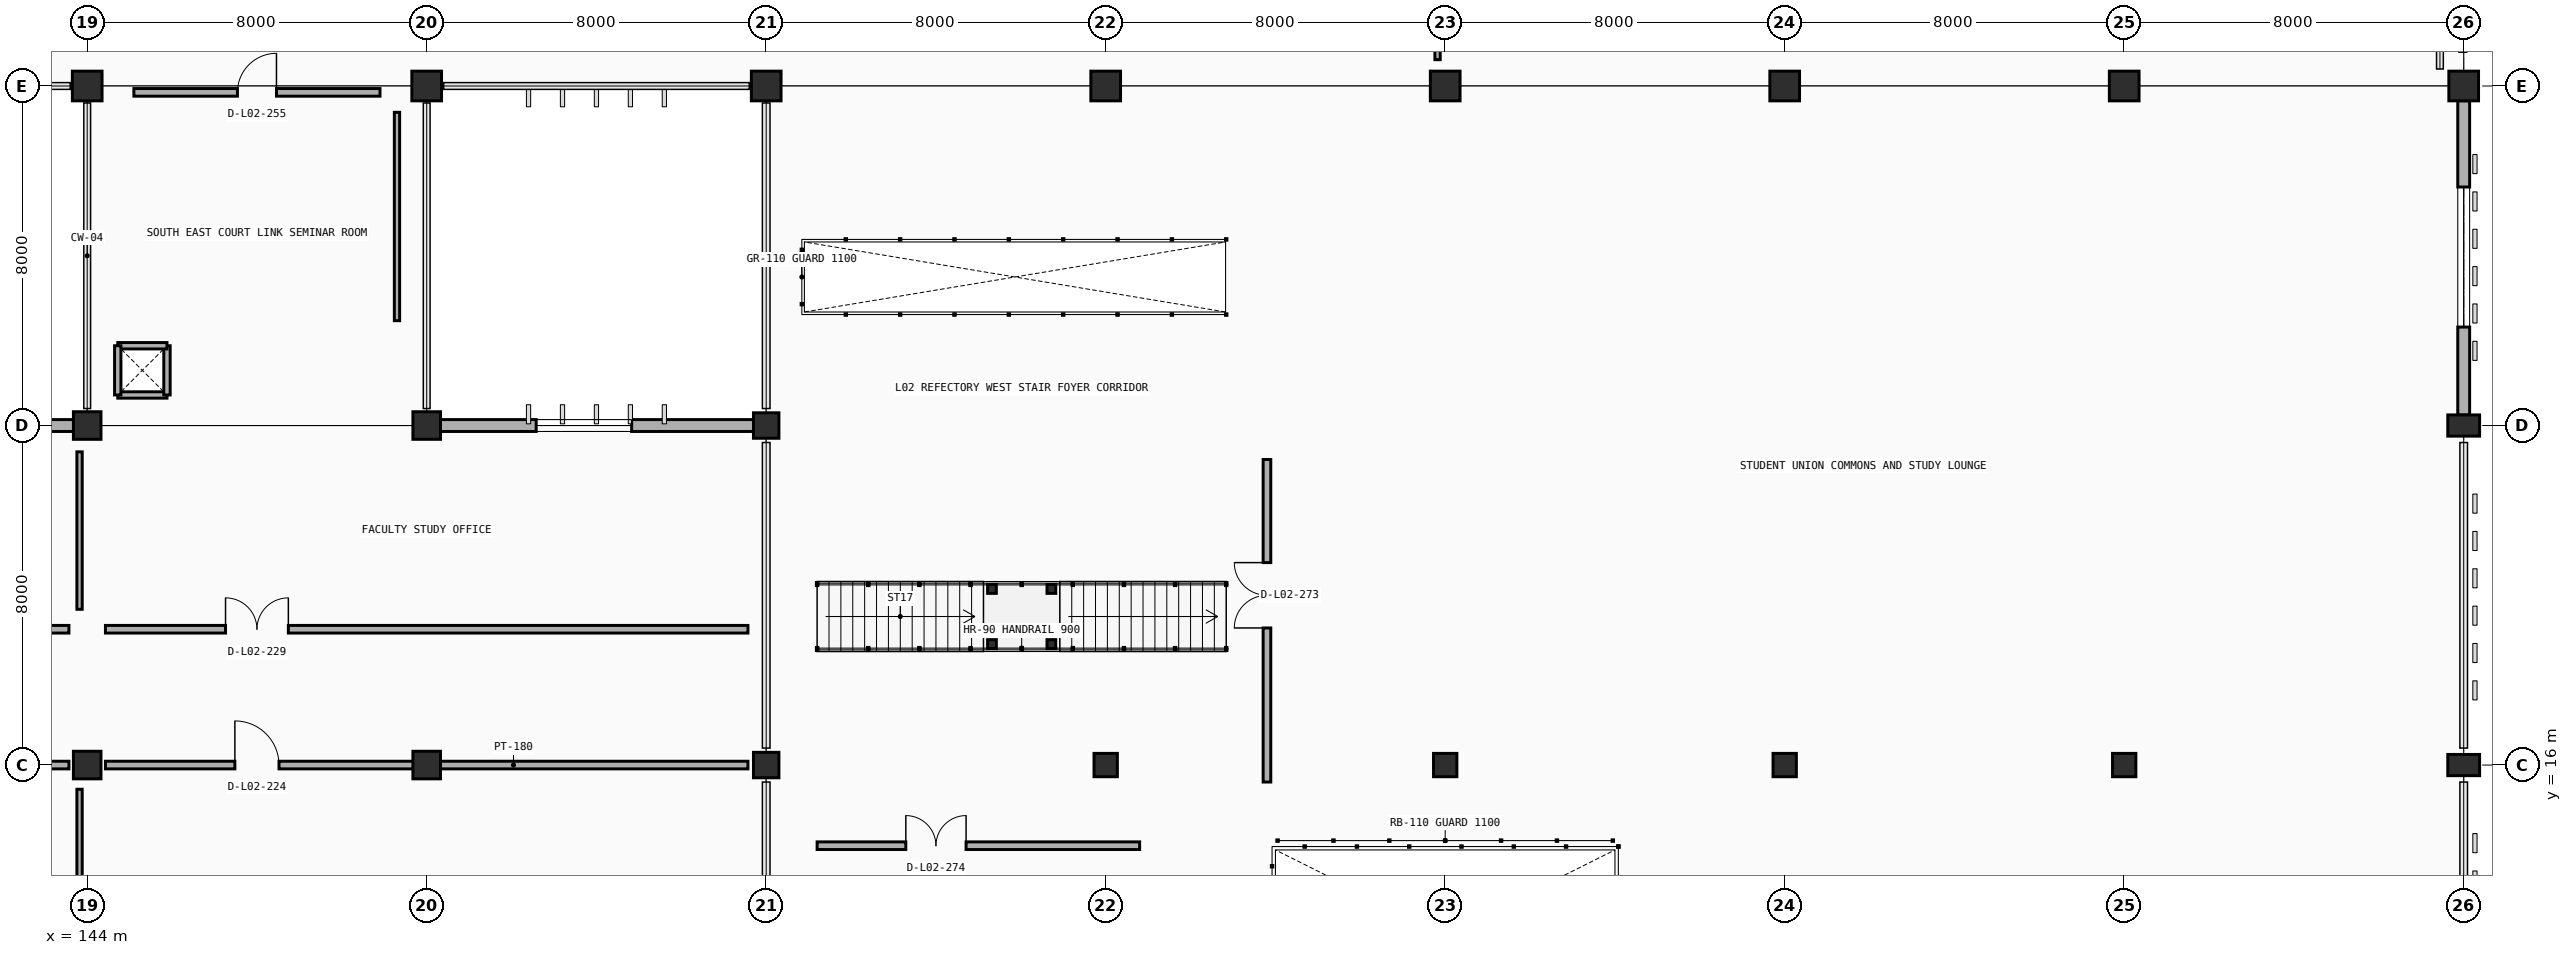
"""IFC4 building model, lengths in metres.
Left out: names, types, materials, properties, quantities, classifications, styles, units other than length and angle.
Written with IfcOpenShell. Run it as: python <this file> out.ifc"""

import sys

from ifc_helpers import new_model, si_unit, direction, frame, frame_2d, origin, origin_2d, place, context, subcontext, project, spatial, rectangle, i_section, extrude, element, fill, save


model = new_model("IFC4")
c1 = context("Model", 3, precision=1e-05, world=origin(), true_north=direction((0.0, 1.0)))
c2 = subcontext(c1, "Body", "Model", "MODEL_VIEW")
j1 = project(units=[si_unit("LENGTHUNIT", "METRE"), si_unit("PLANEANGLEUNIT", "RADIAN")], contexts=[c1])
p1 = place(None, origin())
s1 = spatial("IfcSite", under=j1, at=p1, CompositionType="ELEMENT")
p2 = place(p1, origin())
s2 = spatial("IfcBuilding", under=s1, at=p2, CompositionType="ELEMENT")
p3 = place(p2, frame((0.0, 0.0, 4.8)))
s3 = spatial("IfcBuildingStorey", under=s2, at=p3, CompositionType="ELEMENT", Elevation=4.8)
for number, where, z_axis, x_axis in (
    (1, (144.0, 16.0, 0.0), (0.0, 0.0, 1.0), (1.0, 0.0, 0.0)),
    (2, (152.0, 16.0, 0.0), (0.0, 0.0, 1.0), (1.0, 0.0, 0.0)),
):
    element("IfcColumn", number, at=place(p3, frame(where, z_axis=z_axis, x_axis=x_axis)), inside=s3, PredefinedType="COLUMN", context=c2, shape_type="SweptSolid", body=[
        extrude(rectangle(XDim=0.65, YDim=0.65, at=origin_2d()), origin(), (0.0, 0.0, 1.0), 4.8),
    ])
p4 = place(p3, frame((160.0, 16.0, 0.0), z_axis=(0.0, 0.0, 1.0), x_axis=(1.0, 0.0, 0.0)))
e3 = element("IfcColumn", 3, at=p4, inside=s3, PredefinedType="COLUMN", context=c2, shape_type="SweptSolid", body=[
    extrude(rectangle(XDim=0.6, YDim=0.6, at=origin_2d()), origin(), (0.0, 0.0, 1.0), 4.8),
])
for number, where, z_axis, x_axis in (
    (4, (168.0, 16.0, 0.0), (0.0, 0.0, 1.0), (1.0, 0.0, 0.0)),
    (5, (176.0, 16.0, 0.0), (0.0, 0.0, 1.0), (1.0, 0.0, 0.0)),
    (6, (184.0, 16.0, 0.0), (0.0, 0.0, 1.0), (1.0, 0.0, 0.0)),
    (7, (192.0, 16.0, 0.0), (0.0, 0.0, 1.0), (1.0, 0.0, 0.0)),
):
    element("IfcColumn", number, at=place(p3, frame(where, z_axis=z_axis, x_axis=x_axis)), inside=s3, PredefinedType="COLUMN", context=c2, shape_type="SweptSolid", body=[
        extrude(rectangle(XDim=0.55, YDim=0.55, at=origin_2d()), origin(), (0.0, 0.0, 1.0), 4.8),
    ])
p5 = place(p3, frame((200.0, 16.0, 0.0), z_axis=(0.0, 0.0, 1.0), x_axis=(0.0, 1.0, 0.0)))
e8 = element("IfcColumn", 8, at=p5, inside=s3, PredefinedType="COLUMN", context=c2, shape_type="SweptSolid", body=[
    extrude(rectangle(XDim=0.5, YDim=0.75, at=origin_2d()), origin(), (0.0, 0.0, 1.0), 4.8),
])
for number, where, z_axis, x_axis in (
    (9, (144.0, 24.0, 0.0), (0.0, 0.0, 1.0), (1.0, 0.0, 0.0)),
    (10, (152.0, 24.0, 0.0), (0.0, 0.0, 1.0), (1.0, 0.0, 0.0)),
):
    element("IfcColumn", number, at=place(p3, frame(where, z_axis=z_axis, x_axis=x_axis)), inside=s3, PredefinedType="COLUMN", context=c2, shape_type="SweptSolid", body=[
        extrude(rectangle(XDim=0.65, YDim=0.65, at=origin_2d()), origin(), (0.0, 0.0, 1.0), 4.8),
    ])
p6 = place(p3, frame((160.0, 24.0, 0.0), z_axis=(0.0, 0.0, 1.0), x_axis=(1.0, 0.0, 0.0)))
e11 = element("IfcColumn", 11, at=p6, inside=s3, PredefinedType="COLUMN", context=c2, shape_type="SweptSolid", body=[
    extrude(rectangle(XDim=0.6, YDim=0.6, at=origin_2d()), origin(), (0.0, 0.0, 1.0), 4.8),
])
p7 = place(p3, frame((200.0, 24.0, 0.0), z_axis=(0.0, 0.0, 1.0), x_axis=(0.0, 1.0, 0.0)))
e12 = element("IfcColumn", 12, at=p7, inside=s3, PredefinedType="COLUMN", context=c2, shape_type="SweptSolid", body=[
    extrude(rectangle(XDim=0.5, YDim=0.75, at=origin_2d()), origin(), (0.0, 0.0, 1.0), 4.8),
])
for number, where, z_axis, x_axis in (
    (13, (144.0, 32.0, 0.0), (0.0, 0.0, 1.0), (1.0, 0.0, 0.0)),
    (14, (152.0, 32.0, 0.0), (0.0, 0.0, 1.0), (1.0, 0.0, 0.0)),
    (15, (160.0, 32.0, 0.0), (0.0, 0.0, 1.0), (1.0, 0.0, 0.0)),
    (16, (168.0, 32.0, 0.0), (0.0, 0.0, 1.0), (1.0, 0.0, 0.0)),
    (17, (176.0, 32.0, 0.0), (0.0, 0.0, 1.0), (1.0, 0.0, 0.0)),
    (18, (184.0, 32.0, 0.0), (0.0, 0.0, 1.0), (1.0, 0.0, 0.0)),
    (19, (192.0, 32.0, 0.0), (0.0, 0.0, 1.0), (1.0, 0.0, 0.0)),
    (20, (200.0, 32.0, 0.0), (0.0, 0.0, 1.0), (1.0, 0.0, 0.0)),
):
    element("IfcColumn", number, at=place(p3, frame(where, z_axis=z_axis, x_axis=x_axis)), inside=s3, PredefinedType="COLUMN", context=c2, shape_type="SweptSolid", body=[
        extrude(rectangle(XDim=0.7, YDim=0.7, at=origin_2d()), origin(), (0.0, 0.0, 1.0), 4.8),
    ])
for number, where, z_axis, x_axis in (
    (21, (165.32, 18.85, 0.0), (0.0, 0.0, 1.0), (1.0, 0.0, 0.0)),
    (22, (165.32, 20.15, 0.0), (0.0, 0.0, 1.0), (1.0, 0.0, 0.0)),
    (23, (166.72, 18.85, 0.0), (0.0, 0.0, 1.0), (1.0, 0.0, 0.0)),
    (24, (166.72, 20.15, 0.0), (0.0, 0.0, 1.0), (1.0, 0.0, 0.0)),
):
    element("IfcColumn", number, at=place(p3, frame(where, z_axis=z_axis, x_axis=x_axis)), inside=s3, PredefinedType="COLUMN", context=c2, shape_type="SweptSolid", body=[
        extrude(i_section(OverallWidth=0.206, OverallDepth=0.21, WebThickness=0.01, FlangeThickness=0.014, FilletRadius=0.01, at=origin_2d()), origin(), (0.0, 0.0, 1.0), 2.2),
    ])
p8 = place(p3, frame((136.322, 24.0, 0.0), z_axis=(0.0, 0.0, 1.0), x_axis=(1.0, 0.0, 0.0)))
e25 = element("IfcWall", 25, at=p8, inside=s3, PredefinedType="STANDARD", context=c2, shape_type="SweptSolid", body=[
    extrude(rectangle(XDim=7.356, YDim=0.28, at=frame_2d((3.678, 0.0))), origin(), (0.0, 0.0, 1.0), 3.91),
])
p9 = place(p8, frame((2.258, 0.0, 0.9)))
e26 = element("IfcOpeningElement", 26, at=p9, cuts=e25, PredefinedType="OPENING", context=c2, shape_type="SweptSolid", body=[
    extrude(rectangle(XDim=2.65, YDim=1.25, at=frame_2d((1.325, 0.625))), frame((0.0, 0.15, 0.0), z_axis=(0.0, -1.0, 0.0), x_axis=(1.0, 0.0, 0.0)), (0.0, 0.0, 1.0), 0.3),
])
p10 = place(p3, frame((152.322, 24.0, 0.0), z_axis=(0.0, 0.0, 1.0), x_axis=(1.0, 0.0, 0.0)))
e27 = element("IfcWall", 27, at=p10, inside=s3, PredefinedType="STANDARD", context=c2, shape_type="SweptSolid", body=[
    extrude(rectangle(XDim=7.381, YDim=0.28, at=frame_2d((3.69, 0.0))), origin(), (0.0, 0.0, 1.0), 3.91),
])
p11 = place(p10, frame((2.258, 0.0, 0.9)))
e28 = element("IfcOpeningElement", 28, at=p11, cuts=e27, PredefinedType="OPENING", context=c2, shape_type="SweptSolid", body=[
    extrude(rectangle(XDim=2.25, YDim=1.25, at=frame_2d((1.125, 0.625))), frame((0.0, 0.15, 0.0), z_axis=(0.0, -1.0, 0.0), x_axis=(1.0, 0.0, 0.0)), (0.0, 0.0, 1.0), 0.3),
])
p12 = place(p3, frame((199.76, 32.22, 0.0), z_axis=(0.0, 0.0, 1.0), x_axis=(-1.0, 0.0, 0.0)))
e29 = element("IfcWall", 29, at=p12, inside=s3, PredefinedType="PARAPET", context=c2, shape_type="SweptSolid", body=[
    extrude(rectangle(XDim=0.32, YDim=0.2, at=frame_2d((0.16, 0.0))), origin(), (0.0, 0.0, 1.0), 3.95),
])
p13 = place(p3, frame((200.0, 31.653, 0.0), z_axis=(0.0, 0.0, 1.0), x_axis=(0.0, -1.0, 0.0)))
e30 = element("IfcWall", 30, at=p13, inside=s3, PredefinedType="STANDARD", context=c2, shape_type="SweptSolid", body=[
    extrude(rectangle(XDim=7.406, YDim=0.28, at=frame_2d((3.703, 0.0))), origin(), (0.0, 0.0, 1.0), 3.59),
])
p14 = place(p13, frame((2.033, 0.0, 0.95)))
e31 = element("IfcOpeningElement", 31, at=p14, cuts=e30, PredefinedType="OPENING", context=c2, shape_type="SweptSolid", body=[
    extrude(rectangle(XDim=3.3, YDim=1.75, at=frame_2d((1.65, 0.875))), frame((0.0, 0.15, 0.0), z_axis=(0.0, -1.0, 0.0), x_axis=(1.0, 0.0, 0.0)), (0.0, 0.0, 1.0), 0.3),
])
for number, where, z_axis, x_axis in (
    (32, (144.72, 24.72, 0.0), (0.0, 0.0, 1.0), (1.0, 0.0, 0.0)),
    (33, (145.88, 24.72, 0.0), (0.0, 0.0, 1.0), (0.0, 1.0, 0.0)),
    (34, (145.88, 25.88, 0.0), (0.0, 0.0, 1.0), (-1.0, 0.0, 0.0)),
    (35, (144.72, 25.88, 0.0), (0.0, 0.0, 1.0), (0.0, -1.0, 0.0)),
):
    element("IfcWall", number, at=place(p3, frame(where, z_axis=z_axis, x_axis=x_axis)), inside=s3, PredefinedType="PARTITIONING", context=c2, shape_type="SweptSolid", body=[
        extrude(rectangle(XDim=1.16, YDim=0.15, at=frame_2d((0.58, 0.0))), origin(), (0.0, 0.0, 1.0), 4.5),
    ])
p15 = place(p3, frame((128.43, 16.0, 0.0), z_axis=(0.0, 0.0, 1.0), x_axis=(1.0, 0.0, 0.0)))
e36 = element("IfcWall", 36, at=p15, inside=s3, PredefinedType="PARTITIONING", context=c2, shape_type="SweptSolid", body=[
    extrude(rectangle(XDim=15.14, YDim=0.18, at=frame_2d((7.57, 0.0))), origin(), (0.0, 0.0, 1.0), 3.86),
])
p16 = place(p15, frame((2.66, 0.0, 0.0)))
e37 = element("IfcOpeningElement", 37, at=p16, cuts=e36, PredefinedType="OPENING", context=c2, shape_type="SweptSolid", body=[
    extrude(rectangle(XDim=1.82, YDim=2.25, at=frame_2d((0.91, 1.125))), frame((0.0, 0.1, 0.0), z_axis=(0.0, -1.0, 0.0), x_axis=(1.0, 0.0, 0.0)), (0.0, 0.0, 1.0), 0.2),
])
p17 = place(p3, frame((143.82, 8.62, 0.0), z_axis=(0.0, 0.0, 1.0), x_axis=(0.0, 1.0, 0.0)))
e38 = element("IfcWall", 38, at=p17, inside=s3, PredefinedType="PARTITIONING", context=c2, shape_type="SweptSolid", body=[
    extrude(rectangle(XDim=6.81, YDim=0.125, at=frame_2d((3.405, 0.0))), origin(), (0.0, 0.0, 1.0), 3.76),
])
p18 = place(p3, frame((144.43, 16.0, 0.0), z_axis=(0.0, 0.0, 1.0), x_axis=(1.0, 0.0, 0.0)))
e39 = element("IfcWall", 39, at=p18, inside=s3, PredefinedType="PARTITIONING", context=c2, shape_type="SweptSolid", body=[
    extrude(rectangle(XDim=15.14, YDim=0.18, at=frame_2d((7.57, 0.0))), origin(), (0.0, 0.0, 1.0), 3.86),
])
p19 = place(p18, frame((3.05, 0.0, 0.0)))
e40 = element("IfcOpeningElement", 40, at=p19, cuts=e39, PredefinedType="OPENING", context=c2, shape_type="SweptSolid", body=[
    extrude(rectangle(XDim=1.04, YDim=2.15, at=frame_2d((0.52, 1.075))), frame((0.0, 0.1, 0.0), z_axis=(0.0, -1.0, 0.0), x_axis=(1.0, 0.0, 0.0)), (0.0, 0.0, 1.0), 0.2),
])
p20 = place(p3, frame((120.43, 19.2, 0.0), z_axis=(0.0, 0.0, 1.0), x_axis=(1.0, 0.0, 0.0)))
e41 = element("IfcWall", 41, at=p20, inside=s3, PredefinedType="PARTITIONING", context=c2, shape_type="SweptSolid", body=[
    extrude(rectangle(XDim=23.14, YDim=0.18, at=frame_2d((11.57, 0.0))), origin(), (0.0, 0.0, 1.0), 3.9),
])
p21 = place(p20, frame((2.74, 0.0, 0.0)))
e42 = element("IfcOpeningElement", 42, at=p21, cuts=e41, PredefinedType="OPENING", context=c2, shape_type="SweptSolid", body=[
    extrude(rectangle(XDim=1.66, YDim=2.22, at=frame_2d((0.83, 1.11))), frame((0.0, 0.1, 0.0), z_axis=(0.0, -1.0, 0.0), x_axis=(1.0, 0.0, 0.0)), (0.0, 0.0, 1.0), 0.2),
])
p22 = place(p3, frame((143.82, 19.67, 0.0), z_axis=(0.0, 0.0, 1.0), x_axis=(0.0, 1.0, 0.0)))
e43 = element("IfcWall", 43, at=p22, inside=s3, PredefinedType="PARTITIONING", context=c2, shape_type="SweptSolid", body=[
    extrude(rectangle(XDim=3.71, YDim=0.125, at=frame_2d((1.855, 0.0))), origin(), (0.0, 0.0, 1.0), 3.76),
])
p23 = place(p3, frame((144.43, 19.2, 0.0), z_axis=(0.0, 0.0, 1.0), x_axis=(1.0, 0.0, 0.0)))
e44 = element("IfcWall", 44, at=p23, inside=s3, PredefinedType="PARTITIONING", context=c2, shape_type="SweptSolid", body=[
    extrude(rectangle(XDim=15.14, YDim=0.18, at=frame_2d((7.57, 0.0))), origin(), (0.0, 0.0, 1.0), 3.9),
])
p24 = place(p23, frame((2.83, 0.0, 0.0)))
e45 = element("IfcOpeningElement", 45, at=p24, cuts=e44, PredefinedType="OPENING", context=c2, shape_type="SweptSolid", body=[
    extrude(rectangle(XDim=1.48, YDim=2.2, at=frame_2d((0.74, 1.1))), frame((0.0, 0.1, 0.0), z_axis=(0.0, -1.0, 0.0), x_axis=(1.0, 0.0, 0.0)), (0.0, 0.0, 1.0), 0.2),
])
p25 = place(p3, frame((175.82, 32.62, 0.0), z_axis=(0.0, 0.0, 1.0), x_axis=(0.0, 1.0, 0.0)))
e46 = element("IfcWall", 46, at=p25, inside=s3, PredefinedType="PARTITIONING", context=c2, shape_type="SweptSolid", body=[
    extrude(rectangle(XDim=6.81, YDim=0.125, at=frame_2d((3.405, 0.0))), origin(), (0.0, 0.0, 1.0), 3.76),
])
p26 = place(p3, frame((145.1, 31.85, 0.0), z_axis=(0.0, 0.0, 1.0), x_axis=(1.0, 0.0, 0.0)))
e47 = element("IfcWall", 47, at=p26, inside=s3, PredefinedType="PARTITIONING", context=c2, shape_type="SweptSolid", body=[
    extrude(rectangle(XDim=5.8, YDim=0.18, at=frame_2d((2.9, 0.0))), origin(), (0.0, 0.0, 1.0), 3.9),
])
p27 = place(p26, frame((2.44, 0.0, 0.0)))
e48 = element("IfcOpeningElement", 48, at=p27, cuts=e47, PredefinedType="OPENING", context=c2, shape_type="SweptSolid", body=[
    extrude(rectangle(XDim=0.92, YDim=2.15, at=frame_2d((0.46, 1.075))), frame((0.0, 0.1, 0.0), z_axis=(0.0, -1.0, 0.0), x_axis=(1.0, 0.0, 0.0)), (0.0, 0.0, 1.0), 0.2),
])
p28 = place(p3, frame((151.3, 26.47, 0.0), z_axis=(0.0, 0.0, 1.0), x_axis=(0.0, 1.0, 0.0)))
e49 = element("IfcWall", 49, at=p28, inside=s3, PredefinedType="PARTITIONING", context=c2, shape_type="SweptSolid", body=[
    extrude(rectangle(XDim=4.91, YDim=0.125, at=frame_2d((2.455, 0.0))), origin(), (0.0, 0.0, 1.0), 3.9),
])
p29 = place(p3, frame((171.8, 15.6, 0.0), z_axis=(0.0, 0.0, 1.0), x_axis=(0.0, 1.0, 0.0)))
e50 = element("IfcWall", 50, at=p29, inside=s3, PredefinedType="PARTITIONING", context=c2, shape_type="SweptSolid", body=[
    extrude(rectangle(XDim=7.6, YDim=0.18, at=frame_2d((3.8, 0.0))), origin(), (0.0, 0.0, 1.0), 3.9),
])
p30 = place(p29, frame((3.63, 0.0, 0.0)))
e51 = element("IfcOpeningElement", 51, at=p30, cuts=e50, PredefinedType="OPENING", context=c2, shape_type="SweptSolid", body=[
    extrude(rectangle(XDim=1.54, YDim=2.2, at=frame_2d((0.77, 1.1))), frame((0.0, 0.1, 0.0), z_axis=(0.0, -1.0, 0.0), x_axis=(1.0, 0.0, 0.0)), (0.0, 0.0, 1.0), 0.2),
])
p31 = place(p3, frame((161.2, 14.1, 0.0), z_axis=(0.0, 0.0, 1.0), x_axis=(1.0, 0.0, 0.0)))
e52 = element("IfcWall", 52, at=p31, inside=s3, PredefinedType="PARTITIONING", context=c2, shape_type="SweptSolid", body=[
    extrude(rectangle(XDim=7.6, YDim=0.18, at=frame_2d((3.8, 0.0))), origin(), (0.0, 0.0, 1.0), 3.9),
])
p32 = place(p31, frame((2.09, 0.0, 0.0)))
e53 = element("IfcOpeningElement", 53, at=p32, cuts=e52, PredefinedType="OPENING", context=c2, shape_type="SweptSolid", body=[
    extrude(rectangle(XDim=1.42, YDim=2.2, at=frame_2d((0.71, 1.1))), frame((0.0, 0.1, 0.0), z_axis=(0.0, -1.0, 0.0), x_axis=(1.0, 0.0, 0.0)), (0.0, 0.0, 1.0), 0.2),
])
p33 = place(p11, origin())
e54 = element("IfcWindow", 54, at=p33, inside=s3, PartitioningType="DOUBLE_PANEL_VERTICAL", PredefinedType="WINDOW", context=c2, shape_type="SweptSolid", body=[
    extrude(rectangle(XDim=2.25, YDim=1.25, at=frame_2d((1.125, 0.625))), frame((0.0, 0.03, 0.0), z_axis=(0.0, -1.0, 0.0), x_axis=(1.0, 0.0, 0.0)), (0.0, 0.0, 1.0), 0.06),
])
fill(e28, e54)
p34 = place(p14, origin())
e55 = element("IfcWindow", 55, at=p34, inside=s3, PartitioningType="DOUBLE_PANEL_VERTICAL", PredefinedType="WINDOW", context=c2, shape_type="SweptSolid", body=[
    extrude(rectangle(XDim=3.3, YDim=1.75, at=frame_2d((1.65, 0.875))), frame((0.0, 0.03, 0.0), z_axis=(0.0, -1.0, 0.0), x_axis=(1.0, 0.0, 0.0)), (0.0, 0.0, 1.0), 0.06),
])
fill(e31, e55)
p35 = place(p19, origin())
e56 = element("IfcDoor", 56, at=p35, inside=s3, OperationType="SINGLE_SWING_LEFT", PredefinedType="DOOR", context=c2, shape_type="SweptSolid", body=[
    extrude(rectangle(XDim=1.04, YDim=2.15, at=frame_2d((0.52, 1.075))), frame((0.0, 0.025, 0.0), z_axis=(0.0, -1.0, 0.0), x_axis=(1.0, 0.0, 0.0)), (0.0, 0.0, 1.0), 0.05),
])
fill(e40, e56)
p36 = place(p24, origin())
e57 = element("IfcDoor", 57, at=p36, inside=s3, OperationType="DOUBLE_DOOR_SINGLE_SWING", PredefinedType="DOOR", context=c2, shape_type="SweptSolid", body=[
    extrude(rectangle(XDim=1.48, YDim=2.2, at=frame_2d((0.74, 1.1))), frame((0.0, 0.025, 0.0), z_axis=(0.0, -1.0, 0.0), x_axis=(1.0, 0.0, 0.0)), (0.0, 0.0, 1.0), 0.05),
])
fill(e45, e57)
p37 = place(p27, origin())
e58 = element("IfcDoor", 58, at=p37, inside=s3, OperationType="SINGLE_SWING_RIGHT", PredefinedType="DOOR", context=c2, shape_type="SweptSolid", body=[
    extrude(rectangle(XDim=0.92, YDim=2.15, at=frame_2d((0.46, 1.075))), frame((0.0, 0.025, 0.0), z_axis=(0.0, -1.0, 0.0), x_axis=(1.0, 0.0, 0.0)), (0.0, 0.0, 1.0), 0.05),
])
fill(e48, e58)
p38 = place(p30, origin())
e59 = element("IfcDoor", 59, at=p38, inside=s3, OperationType="DOUBLE_DOOR_SINGLE_SWING", PredefinedType="DOOR", context=c2, shape_type="SweptSolid", body=[
    extrude(rectangle(XDim=1.54, YDim=2.2, at=frame_2d((0.77, 1.1))), frame((0.0, 0.025, 0.0), z_axis=(0.0, -1.0, 0.0), x_axis=(1.0, 0.0, 0.0)), (0.0, 0.0, 1.0), 0.05),
])
fill(e51, e59)
p39 = place(p32, origin())
e60 = element("IfcDoor", 60, at=p39, inside=s3, OperationType="DOUBLE_DOOR_SINGLE_SWING", PredefinedType="DOOR", context=c2, shape_type="SweptSolid", body=[
    extrude(rectangle(XDim=1.42, YDim=2.2, at=frame_2d((0.71, 1.1))), frame((0.0, 0.025, 0.0), z_axis=(0.0, -1.0, 0.0), x_axis=(1.0, 0.0, 0.0)), (0.0, 0.0, 1.0), 0.05),
])
fill(e53, e60)
save(model, sys.argv[1])
